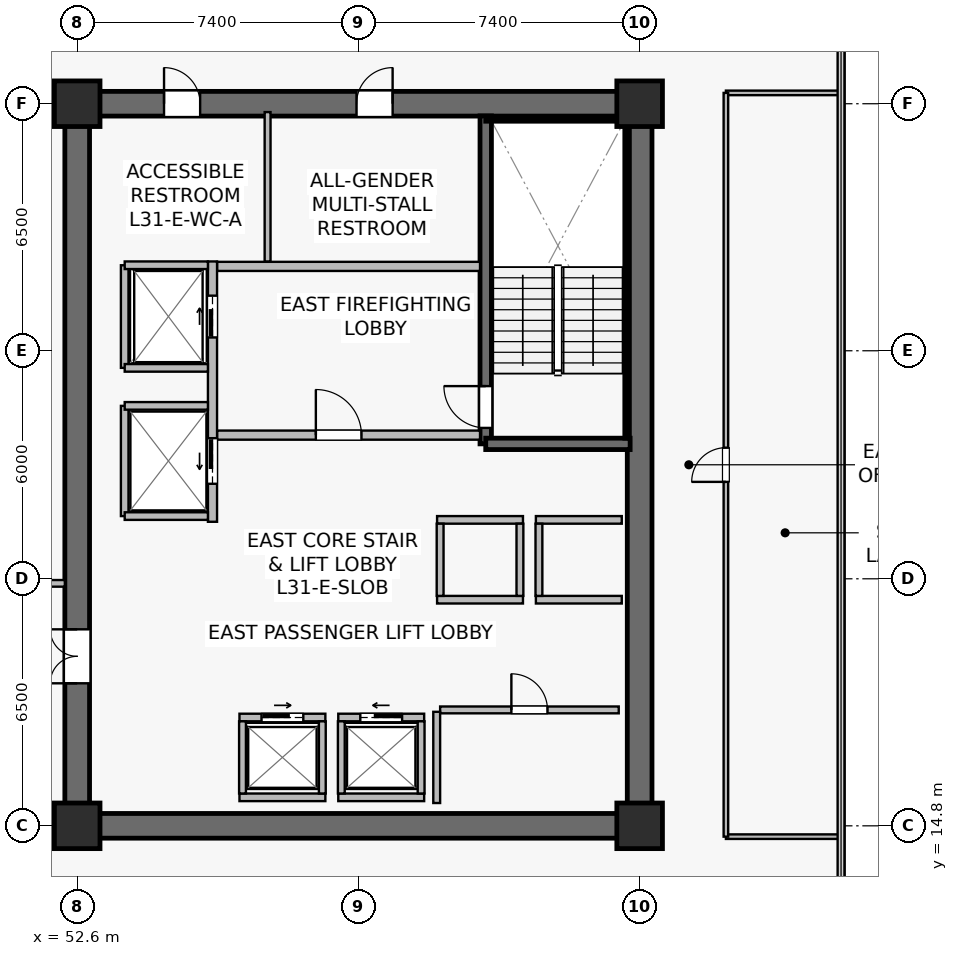
"""IFC4 building model, lengths in metres.
Left out: names, types, materials, properties, quantities, classifications, styles, units other than length and angle.
Written with IfcOpenShell. Run it as: python <this file> out.ifc"""

import sys

from ifc_helpers import new_model, si_unit, direction, frame, frame_2d, origin, origin_2d, place, context, subcontext, project, spatial, rectangle, extrude, source, transform, mapped, element, fill, save


model = new_model("IFC4")
c1 = context("Model", 3, precision=1e-05, world=origin(), true_north=direction((0.0, 1.0)))
c2 = subcontext(c1, "Body", "Model", "MODEL_VIEW")
j1 = project(units=[si_unit("LENGTHUNIT", "METRE"), si_unit("PLANEANGLEUNIT", "RADIAN")], contexts=[c1])
p1 = place(None, origin())
s1 = spatial("IfcSite", under=j1, at=p1, CompositionType="ELEMENT")
p2 = place(p1, origin())
s2 = spatial("IfcBuilding", under=s1, at=p2, CompositionType="ELEMENT")
p3 = place(p2, frame((0.0, 0.0, 129.7)))
s3 = spatial("IfcBuildingStorey", under=s2, at=p3, CompositionType="ELEMENT", Elevation=129.7)
p4 = place(p3, frame((52.275, 14.8, 0.0), z_axis=(0.0, 0.0, 1.0), x_axis=(1.0, 0.0, 0.0)))
e1 = element("IfcWall", 1, at=p4, inside=s3, PredefinedType="SHEAR", context=c2, shape_type="SweptSolid", body=[
    extrude(rectangle(XDim=15.45, YDim=0.65, at=frame_2d((7.725, 0.0))), origin(), (0.0, 0.0, 1.0), 3.79),
])
p5 = place(p3, frame((52.275, 33.8, 0.0), z_axis=(0.0, 0.0, 1.0), x_axis=(1.0, 0.0, 0.0)))
e2 = element("IfcWall", 2, at=p5, inside=s3, PredefinedType="SHEAR", context=c2, shape_type="SweptSolid", body=[
    extrude(rectangle(XDim=15.45, YDim=0.65, at=frame_2d((7.725, 0.0))), origin(), (0.0, 0.0, 1.0), 3.79),
])
p6 = place(p5, frame((7.675, 0.0, 0.0)))
e3 = element("IfcOpeningElement", 3, at=p6, cuts=e2, PredefinedType="OPENING", context=c2, shape_type="SweptSolid", body=[
    extrude(rectangle(XDim=0.95, YDim=2.15, at=frame_2d((0.475, 1.075))), frame((0.0, 0.335, 0.0), z_axis=(0.0, -1.0, 0.0), x_axis=(1.0, 0.0, 0.0)), (0.0, 0.0, 1.0), 0.67),
])
p7 = place(p5, frame((2.61, 0.0, 0.0)))
e4 = element("IfcOpeningElement", 4, at=p7, cuts=e2, PredefinedType="OPENING", context=c2, shape_type="SweptSolid", body=[
    extrude(rectangle(XDim=0.95, YDim=2.15, at=frame_2d((0.475, 1.075))), frame((0.0, 0.335, 0.0), z_axis=(0.0, -1.0, 0.0), x_axis=(1.0, 0.0, 0.0)), (0.0, 0.0, 1.0), 0.67),
])
p8 = place(p3, frame((52.6, 15.125, 0.0), z_axis=(0.0, 0.0, 1.0), x_axis=(0.0, 1.0, 0.0)))
e5 = element("IfcWall", 5, at=p8, inside=s3, PredefinedType="SHEAR", context=c2, shape_type="SweptSolid", body=[
    extrude(rectangle(XDim=18.35, YDim=0.65, at=frame_2d((9.175, 0.0))), origin(), (0.0, 0.0, 1.0), 3.79),
])
p9 = place(p8, frame((3.425, 0.0, 0.0)))
e6 = element("IfcOpeningElement", 6, at=p9, cuts=e5, PredefinedType="OPENING", context=c2, shape_type="SweptSolid", body=[
    extrude(rectangle(XDim=1.42, YDim=2.2, at=frame_2d((0.71, 1.1))), frame((0.0, 0.335, 0.0), z_axis=(0.0, -1.0, 0.0), x_axis=(1.0, 0.0, 0.0)), (0.0, 0.0, 1.0), 0.67),
])
p10 = place(p3, frame((67.4, 15.125, 0.0), z_axis=(0.0, 0.0, 1.0), x_axis=(0.0, 1.0, 0.0)))
e7 = element("IfcWall", 7, at=p10, inside=s3, PredefinedType="SHEAR", context=c2, shape_type="SweptSolid", body=[
    extrude(rectangle(XDim=18.35, YDim=0.65, at=frame_2d((9.175, 0.0))), origin(), (0.0, 0.0, 1.0), 3.79),
])
p11 = place(p3, frame((63.35, 24.85, 0.0), z_axis=(0.0, 0.0, 1.0), x_axis=(0.0, 1.0, 0.0)))
e8 = element("IfcWall", 8, at=p11, inside=s3, PredefinedType="SHEAR", context=c2, shape_type="SweptSolid", body=[
    extrude(rectangle(XDim=8.63, YDim=0.3, at=frame_2d((4.315, 0.0))), origin(), (0.0, 0.0, 1.0), 3.79),
])
p12 = place(p11, frame((0.42, 0.0, 0.0)))
e9 = element("IfcOpeningElement", 9, at=p12, cuts=e8, PredefinedType="OPENING", context=c2, shape_type="SweptSolid", body=[
    extrude(rectangle(XDim=1.1, YDim=2.15, at=frame_2d((0.55, 1.075))), frame((0.0, 0.16, 0.0), z_axis=(0.0, -1.0, 0.0), x_axis=(1.0, 0.0, 0.0)), (0.0, 0.0, 1.0), 0.32),
])
p13 = place(p3, frame((63.35, 24.85, 0.0), z_axis=(0.0, 0.0, 1.0), x_axis=(1.0, 0.0, 0.0)))
e10 = element("IfcWall", 10, at=p13, inside=s3, PredefinedType="SHEAR", context=c2, shape_type="SweptSolid", body=[
    extrude(rectangle(XDim=3.8, YDim=0.3, at=frame_2d((1.9, 0.0))), origin(), (0.0, 0.0, 1.0), 3.79),
])
p14 = place(p3, frame((63.35, 33.4, 0.0), z_axis=(0.0, 0.0, 1.0), x_axis=(1.0, 0.0, 0.0)))
e11 = element("IfcWall", 11, at=p14, inside=s3, PredefinedType="SOLIDWALL", context=c2, shape_type="SweptSolid", body=[
    extrude(rectangle(XDim=3.72, YDim=0.12, at=frame_2d((1.86, 0.0))), origin(), (0.0, 0.0, 1.0), 3.79),
])
p15 = place(p3, frame((67.07, 25.0, 0.0), z_axis=(0.0, 0.0, 1.0), x_axis=(0.0, 1.0, 0.0)))
e12 = element("IfcWall", 12, at=p15, inside=s3, PredefinedType="SOLIDWALL", context=c2, shape_type="SweptSolid", body=[
    extrude(rectangle(XDim=8.32, YDim=0.12, at=frame_2d((4.16, 0.0))), origin(), (0.0, 0.0, 1.0), 3.79),
])
m1 = source(origin(), c2, "Body", "SweptSolid", [
    extrude(rectangle(XDim=1.2, YDim=1.2, at=origin_2d()), origin(), (0.0, 0.0, 1.0), 4.1),
])
for number, where, z_axis, x_axis in (
    (13, (52.6, 14.8, 0.0), (0.0, 0.0, 1.0), (1.0, 0.0, 0.0)),
    (14, (67.4, 14.8, 0.0), (0.0, 0.0, 1.0), (1.0, 0.0, 0.0)),
    (15, (52.6, 33.8, 0.0), (0.0, 0.0, 1.0), (1.0, 0.0, 0.0)),
    (16, (67.4, 33.8, 0.0), (0.0, 0.0, 1.0), (1.0, 0.0, 0.0)),
):
    element("IfcColumn", number, at=place(p3, frame(where, z_axis=z_axis, x_axis=x_axis)), inside=s3, PredefinedType="COLUMN", context=c2, shape_type="MappedRepresentation", body=[
        mapped(m1, transform((0.0, 0.0, 0.0), scale=1.0)),
    ])
p16 = place(p3, frame((56.28, 25.08, 0.0), z_axis=(0.0, 0.0, 1.0), x_axis=(1.0, 0.0, 0.0)))
e17 = element("IfcWall", 17, at=p16, inside=s3, PredefinedType="SOLIDWALL", context=c2, shape_type="SweptSolid", body=[
    extrude(rectangle(XDim=6.92, YDim=0.24, at=frame_2d((3.46, 0.0))), origin(), (0.0, 0.0, 1.0), 3.125),
])
p17 = place(p16, frame((2.6, 0.0, 0.0)))
e18 = element("IfcOpeningElement", 18, at=p17, cuts=e17, PredefinedType="OPENING", context=c2, shape_type="SweptSolid", body=[
    extrude(rectangle(XDim=1.2, YDim=2.16, at=frame_2d((0.6, 1.08))), frame((0.0, 0.13, 0.0), z_axis=(0.0, -1.0, 0.0), x_axis=(1.0, 0.0, 0.0)), (0.0, 0.0, 1.0), 0.26),
])
p18 = place(p3, frame((56.28, 29.52, 0.0), z_axis=(0.0, 0.0, 1.0), x_axis=(1.0, 0.0, 0.0)))
e19 = element("IfcWall", 19, at=p18, inside=s3, PredefinedType="SOLIDWALL", context=c2, shape_type="SweptSolid", body=[
    extrude(rectangle(XDim=6.92, YDim=0.24, at=frame_2d((3.46, 0.0))), origin(), (0.0, 0.0, 1.0), 3.125),
])
p19 = place(p3, frame((56.16, 22.8, 0.0), z_axis=(0.0, 0.0, 1.0), x_axis=(0.0, 1.0, 0.0)))
e20 = element("IfcWall", 20, at=p19, inside=s3, PredefinedType="SOLIDWALL", context=c2, shape_type="SweptSolid", body=[
    extrude(rectangle(XDim=6.85, YDim=0.24, at=frame_2d((3.425, 0.0))), origin(), (0.0, 0.0, 1.0), 2.875),
])
p20 = place(p19, frame((4.85, 0.0, 0.0)))
e21 = element("IfcOpeningElement", 21, at=p20, cuts=e20, PredefinedType="OPENING", context=c2, shape_type="SweptSolid", body=[
    extrude(rectangle(XDim=1.1, YDim=2.22, at=frame_2d((0.55, 1.11))), frame((0.0, 0.13, 0.0), z_axis=(0.0, -1.0, 0.0), x_axis=(1.0, 0.0, 0.0)), (0.0, 0.0, 1.0), 0.26),
])
p21 = place(p19, frame((1.0, 0.0, 0.0)))
e22 = element("IfcOpeningElement", 22, at=p21, cuts=e20, PredefinedType="OPENING", context=c2, shape_type="SweptSolid", body=[
    extrude(rectangle(XDim=1.2, YDim=2.22, at=frame_2d((0.6, 1.11))), frame((0.0, 0.13, 0.0), z_axis=(0.0, -1.0, 0.0), x_axis=(1.0, 0.0, 0.0)), (0.0, 0.0, 1.0), 0.26),
])
p22 = place(p3, frame((59.47, 17.65, 0.0), z_axis=(0.0, 0.0, 1.0), x_axis=(1.0, 0.0, 0.0)))
e23 = element("IfcWall", 23, at=p22, inside=s3, PredefinedType="SOLIDWALL", context=c2, shape_type="SweptSolid", body=[
    extrude(rectangle(XDim=2.26, YDim=0.2, at=frame_2d((1.13, 0.0))), origin(), (0.0, 0.0, 1.0), 3.125),
])
p23 = place(p22, frame((0.58, 0.0, 0.0)))
e24 = element("IfcOpeningElement", 24, at=p23, cuts=e23, PredefinedType="OPENING", context=c2, shape_type="SweptSolid", body=[
    extrude(rectangle(XDim=1.1, YDim=2.22, at=frame_2d((0.55, 1.11))), frame((0.0, 0.11, 0.0), z_axis=(0.0, -1.0, 0.0), x_axis=(1.0, 0.0, 0.0)), (0.0, 0.0, 1.0), 0.22),
])
p24 = place(p3, frame((59.47, 15.55, 0.0), z_axis=(0.0, 0.0, 1.0), x_axis=(1.0, 0.0, 0.0)))
e25 = element("IfcWall", 25, at=p24, inside=s3, PredefinedType="SOLIDWALL", context=c2, shape_type="SweptSolid", body=[
    extrude(rectangle(XDim=2.26, YDim=0.2, at=frame_2d((1.13, 0.0))), origin(), (0.0, 0.0, 1.0), 3.125),
])
for number, where, z_axis, x_axis in (
    (26, (59.55, 15.65, 0.0), (0.0, 0.0, 1.0), (0.0, 1.0, 0.0)),
    (27, (61.65, 15.65, 0.0), (0.0, 0.0, 1.0), (0.0, 1.0, 0.0)),
):
    element("IfcWall", number, at=place(p3, frame(where, z_axis=z_axis, x_axis=x_axis)), inside=s3, PredefinedType="SOLIDWALL", context=c2, shape_type="SweptSolid", body=[
        extrude(rectangle(XDim=1.9, YDim=0.18, at=frame_2d((0.95, 0.0))), origin(), (0.0, 0.0, 1.0), 3.79),
    ])
p25 = place(p3, frame((56.87, 17.65, 0.0), z_axis=(0.0, 0.0, 1.0), x_axis=(1.0, 0.0, 0.0)))
e28 = element("IfcWall", 28, at=p25, inside=s3, PredefinedType="SOLIDWALL", context=c2, shape_type="SweptSolid", body=[
    extrude(rectangle(XDim=2.26, YDim=0.2, at=frame_2d((1.13, 0.0))), origin(), (0.0, 0.0, 1.0), 3.79),
])
p26 = place(p25, frame((0.58, 0.0, 0.0)))
e29 = element("IfcOpeningElement", 29, at=p26, cuts=e28, PredefinedType="OPENING", context=c2, shape_type="SweptSolid", body=[
    extrude(rectangle(XDim=1.1, YDim=2.22, at=frame_2d((0.55, 1.11))), frame((0.0, 0.11, 0.0), z_axis=(0.0, -1.0, 0.0), x_axis=(1.0, 0.0, 0.0)), (0.0, 0.0, 1.0), 0.22),
])
p27 = place(p3, frame((56.87, 15.55, 0.0), z_axis=(0.0, 0.0, 1.0), x_axis=(1.0, 0.0, 0.0)))
e30 = element("IfcWall", 30, at=p27, inside=s3, PredefinedType="SOLIDWALL", context=c2, shape_type="SweptSolid", body=[
    extrude(rectangle(XDim=2.26, YDim=0.2, at=frame_2d((1.13, 0.0))), origin(), (0.0, 0.0, 1.0), 3.79),
])
for number, where, z_axis, x_axis in (
    (31, (56.95, 15.65, 0.0), (0.0, 0.0, 1.0), (0.0, 1.0, 0.0)),
    (32, (59.05, 15.65, 0.0), (0.0, 0.0, 1.0), (0.0, 1.0, 0.0)),
):
    element("IfcWall", number, at=place(p3, frame(where, z_axis=z_axis, x_axis=x_axis)), inside=s3, PredefinedType="SOLIDWALL", context=c2, shape_type="SweptSolid", body=[
        extrude(rectangle(XDim=1.9, YDim=0.18, at=frame_2d((0.95, 0.0))), origin(), (0.0, 0.0, 1.0), 3.79),
    ])
for number, where, z_axis, x_axis in (
    (33, (64.67, 20.75, 0.0), (0.0, 0.0, 1.0), (1.0, 0.0, 0.0)),
    (34, (64.67, 22.85, 0.0), (0.0, 0.0, 1.0), (1.0, 0.0, 0.0)),
):
    element("IfcWall", number, at=place(p3, frame(where, z_axis=z_axis, x_axis=x_axis)), inside=s3, PredefinedType="SOLIDWALL", context=c2, shape_type="SweptSolid", body=[
        extrude(rectangle(XDim=2.26, YDim=0.2, at=frame_2d((1.13, 0.0))), origin(), (0.0, 0.0, 1.0), 3.79),
    ])
p28 = place(p3, frame((64.75, 20.85, 0.0), z_axis=(0.0, 0.0, 1.0), x_axis=(0.0, 1.0, 0.0)))
e35 = element("IfcWall", 35, at=p28, inside=s3, PredefinedType="SOLIDWALL", context=c2, shape_type="SweptSolid", body=[
    extrude(rectangle(XDim=1.9, YDim=0.18, at=frame_2d((0.95, 0.0))), origin(), (0.0, 0.0, 1.0), 3.79),
])
for number, where, z_axis, x_axis in (
    (36, (62.07, 20.75, 0.0), (0.0, 0.0, 1.0), (1.0, 0.0, 0.0)),
    (37, (62.07, 22.85, 0.0), (0.0, 0.0, 1.0), (1.0, 0.0, 0.0)),
):
    element("IfcWall", number, at=place(p3, frame(where, z_axis=z_axis, x_axis=x_axis)), inside=s3, PredefinedType="SOLIDWALL", context=c2, shape_type="SweptSolid", body=[
        extrude(rectangle(XDim=2.26, YDim=0.2, at=frame_2d((1.13, 0.0))), origin(), (0.0, 0.0, 1.0), 3.79),
    ])
for number, where, z_axis, x_axis in (
    (38, (62.15, 20.85, 0.0), (0.0, 0.0, 1.0), (0.0, 1.0, 0.0)),
    (39, (64.25, 20.85, 0.0), (0.0, 0.0, 1.0), (0.0, 1.0, 0.0)),
):
    element("IfcWall", number, at=place(p3, frame(where, z_axis=z_axis, x_axis=x_axis)), inside=s3, PredefinedType="SOLIDWALL", context=c2, shape_type="SweptSolid", body=[
        extrude(rectangle(XDim=1.9, YDim=0.18, at=frame_2d((0.95, 0.0))), origin(), (0.0, 0.0, 1.0), 3.79),
    ])
p29 = place(p3, frame((53.85, 26.85, 0.0), z_axis=(0.0, 0.0, 1.0), x_axis=(0.0, 1.0, 0.0)))
e40 = element("IfcWall", 40, at=p29, inside=s3, PredefinedType="SOLIDWALL", context=c2, shape_type="SweptSolid", body=[
    extrude(rectangle(XDim=2.7, YDim=0.2, at=frame_2d((1.35, 0.0))), origin(), (0.0, 0.0, 1.0), 3.79),
])
p30 = place(p3, frame((53.85, 29.55, 0.0), z_axis=(0.0, 0.0, 1.0), x_axis=(1.0, 0.0, 0.0)))
e41 = element("IfcWall", 41, at=p30, inside=s3, PredefinedType="SOLIDWALL", context=c2, shape_type="SweptSolid", body=[
    extrude(rectangle(XDim=2.19, YDim=0.2, at=frame_2d((1.095, 0.0))), origin(), (0.0, 0.0, 1.0), 3.79),
])
p31 = place(p3, frame((53.85, 26.85, 0.0), z_axis=(0.0, 0.0, 1.0), x_axis=(1.0, 0.0, 0.0)))
e42 = element("IfcWall", 42, at=p31, inside=s3, PredefinedType="SOLIDWALL", context=c2, shape_type="SweptSolid", body=[
    extrude(rectangle(XDim=2.19, YDim=0.2, at=frame_2d((1.095, 0.0))), origin(), (0.0, 0.0, 1.0), 3.187),
])
p32 = place(p3, frame((53.85, 22.95, 0.0), z_axis=(0.0, 0.0, 1.0), x_axis=(0.0, 1.0, 0.0)))
e43 = element("IfcWall", 43, at=p32, inside=s3, PredefinedType="SOLIDWALL", context=c2, shape_type="SweptSolid", body=[
    extrude(rectangle(XDim=2.9, YDim=0.2, at=frame_2d((1.45, 0.0))), origin(), (0.0, 0.0, 1.0), 2.875),
])
for number, where, z_axis, x_axis in (
    (44, (53.85, 25.85, 0.0), (0.0, 0.0, 1.0), (1.0, 0.0, 0.0)),
    (45, (53.85, 22.95, 0.0), (0.0, 0.0, 1.0), (1.0, 0.0, 0.0)),
):
    element("IfcWall", number, at=place(p3, frame(where, z_axis=z_axis, x_axis=x_axis)), inside=s3, PredefinedType="SOLIDWALL", context=c2, shape_type="SweptSolid", body=[
        extrude(rectangle(XDim=2.19, YDim=0.2, at=frame_2d((1.095, 0.0))), origin(), (0.0, 0.0, 1.0), 3.79),
    ])
p33 = place(p3, frame((62.15, 17.85, 0.0), z_axis=(0.0, 0.0, 1.0), x_axis=(1.0, 0.0, 0.0)))
e46 = element("IfcWall", 46, at=p33, inside=s3, PredefinedType="SOLIDWALL", context=c2, shape_type="SweptSolid", body=[
    extrude(rectangle(XDim=4.7, YDim=0.18, at=frame_2d((2.35, 0.0))), origin(), (0.0, 0.0, 1.0), 3.79),
])
p34 = place(p33, frame((1.875, 0.0, 0.0)))
e47 = element("IfcOpeningElement", 47, at=p34, cuts=e46, PredefinedType="OPENING", context=c2, shape_type="SweptSolid", body=[
    extrude(rectangle(XDim=0.95, YDim=2.15, at=frame_2d((0.475, 1.075))), frame((0.0, 0.1, 0.0), z_axis=(0.0, -1.0, 0.0), x_axis=(1.0, 0.0, 0.0)), (0.0, 0.0, 1.0), 0.2),
])
p35 = place(p3, frame((62.06, 15.4, 0.0), z_axis=(0.0, 0.0, 1.0), x_axis=(0.0, 1.0, 0.0)))
e48 = element("IfcWall", 48, at=p35, inside=s3, PredefinedType="SOLIDWALL", context=c2, shape_type="SweptSolid", body=[
    extrude(rectangle(XDim=2.4, YDim=0.18, at=frame_2d((1.2, 0.0))), origin(), (0.0, 0.0, 1.0), 3.79),
])
p36 = place(p3, frame((57.61, 29.65, 0.0), z_axis=(0.0, 0.0, 1.0), x_axis=(0.0, 1.0, 0.0)))
e49 = element("IfcWall", 49, at=p36, inside=s3, PredefinedType="PLUMBINGWALL", context=c2, shape_type="SweptSolid", body=[
    extrude(rectangle(XDim=3.93, YDim=0.155, at=frame_2d((1.965, 0.0))), origin(), (0.0, 0.0, 1.0), 3.79),
])
p37 = place(p3, frame((48.3, 34.26, 0.0), z_axis=(0.0, 0.0, 1.0), x_axis=(1.0, 0.0, 0.0)))
e50 = element("IfcWall", 50, at=p37, inside=s3, PredefinedType="PARTITIONING", context=c2, shape_type="SweptSolid", body=[
    extrude(rectangle(XDim=3.975, YDim=0.175, at=frame_2d((1.987, 0.0))), origin(), (0.0, 0.0, 1.0), 3.475),
])
p38 = place(p3, frame((48.3, 21.18, 0.0), z_axis=(0.0, 0.0, 1.0), x_axis=(1.0, 0.0, 0.0)))
e51 = element("IfcWall", 51, at=p38, inside=s3, PredefinedType="PARTITIONING", context=c2, shape_type="SweptSolid", body=[
    extrude(rectangle(XDim=3.975, YDim=0.175, at=frame_2d((1.987, 0.0))), origin(), (0.0, 0.0, 1.0), 3.79),
])
p39 = place(p38, frame((1.35, 0.0, 0.0)))
e52 = element("IfcOpeningElement", 52, at=p39, cuts=e51, PredefinedType="OPENING", context=c2, shape_type="SweptSolid", body=[
    extrude(rectangle(XDim=0.95, YDim=2.15, at=frame_2d((0.475, 1.075))), frame((0.0, 0.098, 0.0), z_axis=(0.0, -1.0, 0.0), x_axis=(1.0, 0.0, 0.0)), (0.0, 0.0, 1.0), 0.195),
])
for number, where, z_axis, x_axis in (
    (53, (69.67, 14.515, 0.0), (0.0, 0.0, 1.0), (1.0, 0.0, 0.0)),
    (54, (69.67, 34.085, 0.0), (0.0, 0.0, 1.0), (1.0, 0.0, 0.0)),
):
    element("IfcWall", number, at=place(p3, frame(where, z_axis=z_axis, x_axis=x_axis)), inside=s3, PredefinedType="PARTITIONING", context=c2, shape_type="SweptSolid", body=[
        extrude(rectangle(XDim=3.02, YDim=0.12, at=frame_2d((1.51, 0.0))), origin(), (0.0, 0.0, 1.0), 3.79),
    ])
p40 = place(p3, frame((69.67, 14.515, 0.0), z_axis=(0.0, 0.0, 1.0), x_axis=(0.0, 1.0, 0.0)))
e55 = element("IfcWall", 55, at=p40, inside=s3, PredefinedType="PARTITIONING", context=c2, shape_type="SweptSolid", body=[
    extrude(rectangle(XDim=19.57, YDim=0.12, at=frame_2d((9.785, 0.0))), origin(), (0.0, 0.0, 1.0), 3.79),
])
p41 = place(p40, frame((9.335, 0.0, 0.0)))
e56 = element("IfcOpeningElement", 56, at=p41, cuts=e55, PredefinedType="OPENING", context=c2, shape_type="SweptSolid", body=[
    extrude(rectangle(XDim=0.9, YDim=2.1, at=frame_2d((0.45, 1.05))), frame((0.0, 0.07, 0.0), z_axis=(0.0, -1.0, 0.0), x_axis=(1.0, 0.0, 0.0)), (0.0, 0.0, 1.0), 0.14),
])
m2 = source(origin(), c2, "Body", "SweptSolid", [
    extrude(rectangle(XDim=1.1, YDim=2.15, at=frame_2d((0.55, 1.075))), frame((0.0, 0.025, 0.0), z_axis=(0.0, -1.0, 0.0), x_axis=(1.0, 0.0, 0.0)), (0.0, 0.0, 1.0), 0.05),
])
p42 = place(p12, origin())
e57 = element("IfcDoor", 57, at=p42, inside=s3, OperationType="SINGLE_SWING_RIGHT", PredefinedType="DOOR", context=c2, shape_type="MappedRepresentation", body=[
    mapped(m2, transform((0.0, 0.0, 0.0), scale=1.0)),
])
fill(e9, e57)
m3 = source(origin(), c2, "Body", "SweptSolid", [
    extrude(rectangle(XDim=1.2, YDim=2.16, at=frame_2d((0.6, 1.08))), frame((0.0, 0.025, 0.0), z_axis=(0.0, -1.0, 0.0), x_axis=(1.0, 0.0, 0.0)), (0.0, 0.0, 1.0), 0.05),
])
p43 = place(p17, origin())
e58 = element("IfcDoor", 58, at=p43, inside=s3, OperationType="SINGLE_SWING_LEFT", PredefinedType="DOOR", context=c2, shape_type="MappedRepresentation", body=[
    mapped(m3, transform((0.0, 0.0, 0.0), scale=1.0)),
])
fill(e18, e58)
m4 = source(origin(), c2, "Body", "SweptSolid", [
    extrude(rectangle(XDim=1.1, YDim=2.22, at=frame_2d((0.55, 1.11))), frame((0.0, 0.025, 0.0), z_axis=(0.0, -1.0, 0.0), x_axis=(1.0, 0.0, 0.0)), (0.0, 0.0, 1.0), 0.05),
])
p44 = place(p23, origin())
e59 = element("IfcDoor", 59, at=p44, inside=s3, OperationType="SLIDING_TO_LEFT", PredefinedType="USERDEFINED", context=c2, shape_type="MappedRepresentation", body=[
    mapped(m4, transform((0.0, 0.0, 0.0), scale=1.0)),
])
fill(e24, e59)
p45 = place(p26, origin())
e60 = element("IfcDoor", 60, at=p45, inside=s3, OperationType="SLIDING_TO_RIGHT", PredefinedType="USERDEFINED", context=c2, shape_type="MappedRepresentation", body=[
    mapped(m4, transform((0.0, 0.0, 0.0), scale=1.0)),
])
fill(e29, e60)
p46 = place(p20, origin())
e61 = element("IfcDoor", 61, at=p46, inside=s3, OperationType="SLIDING_TO_RIGHT", PredefinedType="USERDEFINED", context=c2, shape_type="MappedRepresentation", body=[
    mapped(m4, transform((0.0, 0.0, 0.0), scale=1.0)),
])
fill(e21, e61)
m5 = source(origin(), c2, "Body", "SweptSolid", [
    extrude(rectangle(XDim=1.2, YDim=2.22, at=frame_2d((0.6, 1.11))), frame((0.0, 0.025, 0.0), z_axis=(0.0, -1.0, 0.0), x_axis=(1.0, 0.0, 0.0)), (0.0, 0.0, 1.0), 0.05),
])
p47 = place(p21, origin())
e62 = element("IfcDoor", 62, at=p47, inside=s3, OperationType="SLIDING_TO_LEFT", PredefinedType="USERDEFINED", context=c2, shape_type="MappedRepresentation", body=[
    mapped(m5, transform((0.0, 0.0, 0.0), scale=1.0)),
])
fill(e22, e62)
m6 = source(origin(), c2, "Body", "SweptSolid", [
    extrude(rectangle(XDim=0.95, YDim=2.15, at=frame_2d((0.475, 1.075))), frame((0.0, 0.025, 0.0), z_axis=(0.0, -1.0, 0.0), x_axis=(1.0, 0.0, 0.0)), (0.0, 0.0, 1.0), 0.05),
])
p48 = place(p34, origin())
e63 = element("IfcDoor", 63, at=p48, inside=s3, OperationType="SINGLE_SWING_LEFT", PredefinedType="DOOR", context=c2, shape_type="MappedRepresentation", body=[
    mapped(m6, transform((0.0, 0.0, 0.0), scale=1.0)),
])
fill(e47, e63)
m7 = source(origin(), c2, "Body", "SweptSolid", [
    extrude(rectangle(XDim=1.42, YDim=2.2, at=frame_2d((0.71, 1.1))), frame((0.0, 0.025, 0.0), z_axis=(0.0, -1.0, 0.0), x_axis=(1.0, 0.0, 0.0)), (0.0, 0.0, 1.0), 0.05),
])
p49 = place(p9, origin())
e64 = element("IfcDoor", 64, at=p49, inside=s3, OperationType="DOUBLE_DOOR_SINGLE_SWING", PredefinedType="DOOR", context=c2, shape_type="MappedRepresentation", body=[
    mapped(m7, transform((0.0, 0.0, 0.0), scale=1.0)),
])
fill(e6, e64)
p50 = place(p6, origin())
e65 = element("IfcDoor", 65, at=p50, inside=s3, OperationType="SINGLE_SWING_RIGHT", PredefinedType="DOOR", context=c2, shape_type="MappedRepresentation", body=[
    mapped(m6, transform((0.0, 0.0, 0.0), scale=1.0)),
])
fill(e3, e65)
p51 = place(p7, origin())
e66 = element("IfcDoor", 66, at=p51, inside=s3, OperationType="SINGLE_SWING_LEFT", PredefinedType="DOOR", context=c2, shape_type="MappedRepresentation", body=[
    mapped(m6, transform((0.0, 0.0, 0.0), scale=1.0)),
])
fill(e4, e66)
m8 = source(origin(), c2, "Body", "SweptSolid", [
    extrude(rectangle(XDim=0.9, YDim=2.1, at=frame_2d((0.45, 1.05))), frame((0.0, 0.025, 0.0), z_axis=(0.0, -1.0, 0.0), x_axis=(1.0, 0.0, 0.0)), (0.0, 0.0, 1.0), 0.05),
])
p52 = place(p41, origin())
e67 = element("IfcDoor", 67, at=p52, inside=s3, OperationType="SINGLE_SWING_LEFT", PredefinedType="DOOR", context=c2, shape_type="MappedRepresentation", body=[
    mapped(m8, transform((0.0, 0.0, 0.0), scale=1.0)),
])
fill(e56, e67)
save(model, sys.argv[1])
